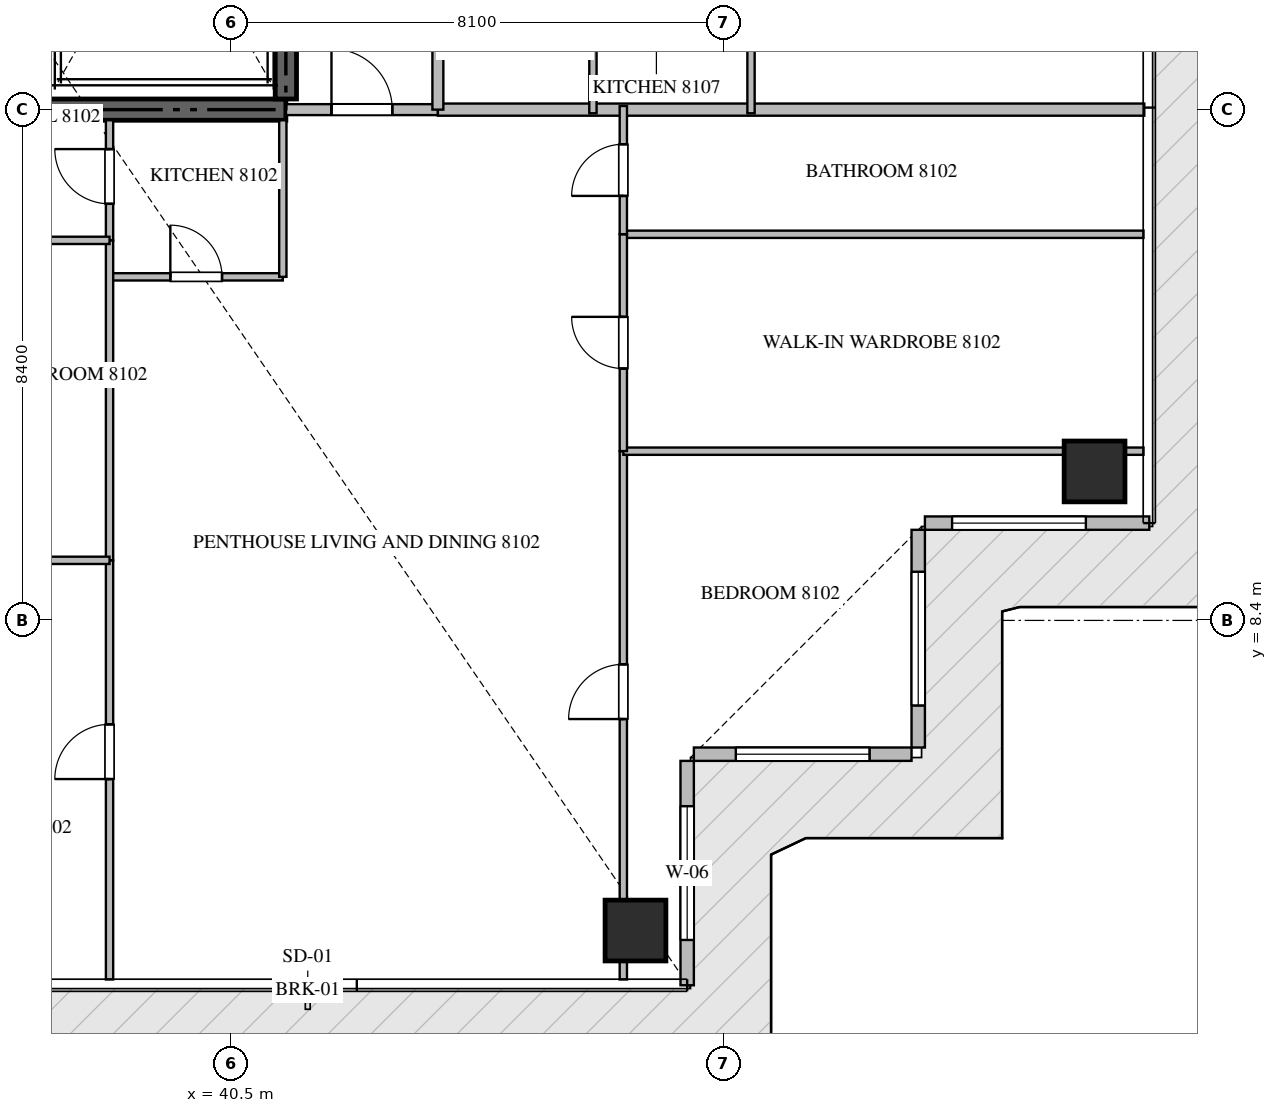
"""IFC4 building model, lengths in metres.
Left out: names, types, materials, properties, quantities, classifications, styles, units other than length and angle.
Written with IfcOpenShell. Run it as: python <this file> out.ifc"""

import sys

from ifc_helpers import new_model, si_unit, direction, frame, frame_2d, origin, origin_2d, place, context, subcontext, project, spatial, rectangle, extrude, source, transform, mapped, element, fill, save


model = new_model("IFC4")
c1 = context("Model", 3, precision=1e-05, world=origin(), true_north=direction((0.0, 1.0)))
c2 = subcontext(c1, "Body", "Model", "MODEL_VIEW")
j1 = project(units=[si_unit("LENGTHUNIT", "METRE"), si_unit("PLANEANGLEUNIT", "RADIAN")], contexts=[c1])
p1 = place(None, origin())
s1 = spatial("IfcSite", under=j1, at=p1, CompositionType="ELEMENT")
p2 = place(p1, origin())
s2 = spatial("IfcBuilding", under=s1, at=p2, CompositionType="ELEMENT")
p3 = place(p2, frame((0.0, 0.0, 325.85)))
s3 = spatial("IfcBuildingStorey", under=s2, at=p3, CompositionType="ELEMENT", Elevation=325.85)
p4 = place(p3, frame((23.4, 16.8, -0.26), z_axis=(0.0, 0.0, 1.0), x_axis=(1.0, 0.0, 0.0)))
e1 = element("IfcWall", 1, at=p4, inside=s3, PredefinedType="SHEAR", context=c2, shape_type="SweptSolid", body=[
    extrude(rectangle(XDim=18.0, YDim=0.35, at=frame_2d((9.0, 0.0))), origin(), (0.0, 0.0, 1.0), 4.048),
])
p5 = place(p3, frame((41.4, 16.975, -0.26), z_axis=(0.0, 0.0, 1.0), x_axis=(0.0, 1.0, 0.0)))
e2 = element("IfcWall", 2, at=p5, inside=s3, PredefinedType="SHEAR", context=c2, shape_type="SweptSolid", body=[
    extrude(rectangle(XDim=8.375, YDim=0.35, at=frame_2d((4.188, 0.0))), origin(), (0.0, 0.0, 1.0), 4.048),
])
m1 = source(origin(), c2, "Body", "SweptSolid", [
    extrude(rectangle(XDim=1.0, YDim=1.0, at=origin_2d()), origin(), (0.0, 0.0, 1.0), 4.05),
])
for number, where, z_axis, x_axis in (
    (3, (47.15, 3.3, -0.26), (0.0, 0.0, 1.0), (1.0, 0.0, 0.0)),
    (4, (54.7, 10.85, -0.26), (0.0, 0.0, 1.0), (1.0, 0.0, 0.0)),
):
    element("IfcColumn", number, at=place(p3, frame(where, z_axis=z_axis, x_axis=x_axis)), inside=s3, PredefinedType="COLUMN", context=c2, shape_type="MappedRepresentation", body=[
        mapped(m1, transform((0.0, 0.0, 0.0), scale=1.0)),
    ])
p6 = place(p3, frame((48.0, 2.4, 0.0), z_axis=(0.0, 0.0, 1.0), x_axis=(0.0, 1.0, 0.0)))
e5 = element("IfcWall", 5, at=p6, inside=s3, PredefinedType="ELEMENTEDWALL", context=c2, shape_type="SweptSolid", body=[
    extrude(rectangle(XDim=3.69, YDim=0.22, at=frame_2d((1.845, 0.0))), origin(), (0.0, 0.0, 1.0), 3.775),
])
p7 = place(p6, frame((0.745, 0.0, 0.65)))
e6 = element("IfcOpeningElement", 6, at=p7, cuts=e5, PredefinedType="OPENING", context=c2, shape_type="SweptSolid", body=[
    extrude(rectangle(XDim=2.2, YDim=2.4, at=frame_2d((1.1, 1.2))), frame((0.0, 0.12, 0.0), z_axis=(0.0, -1.0, 0.0), x_axis=(1.0, 0.0, 0.0)), (0.0, 0.0, 1.0), 0.24),
])
p8 = place(p3, frame((48.11, 6.2, 0.0), z_axis=(0.0, 0.0, 1.0), x_axis=(1.0, 0.0, 0.0)))
e7 = element("IfcWall", 7, at=p8, inside=s3, PredefinedType="ELEMENTEDWALL", context=c2, shape_type="SweptSolid", body=[
    extrude(rectangle(XDim=3.58, YDim=0.22, at=frame_2d((1.79, 0.0))), origin(), (0.0, 0.0, 1.0), 3.775),
])
p9 = place(p8, frame((0.69, 0.0, 0.65)))
e8 = element("IfcOpeningElement", 8, at=p9, cuts=e7, PredefinedType="OPENING", context=c2, shape_type="SweptSolid", body=[
    extrude(rectangle(XDim=2.2, YDim=2.4, at=frame_2d((1.1, 1.2))), frame((0.0, 0.12, 0.0), z_axis=(0.0, -1.0, 0.0), x_axis=(1.0, 0.0, 0.0)), (0.0, 0.0, 1.0), 0.24),
])
p10 = place(p3, frame((51.8, 6.31, 0.0), z_axis=(0.0, 0.0, 1.0), x_axis=(0.0, 1.0, 0.0)))
e9 = element("IfcWall", 9, at=p10, inside=s3, PredefinedType="ELEMENTEDWALL", context=c2, shape_type="SweptSolid", body=[
    extrude(rectangle(XDim=3.58, YDim=0.22, at=frame_2d((1.79, 0.0))), origin(), (0.0, 0.0, 1.0), 3.775),
])
p11 = place(p10, frame((0.69, 0.0, 0.65)))
e10 = element("IfcOpeningElement", 10, at=p11, cuts=e9, PredefinedType="OPENING", context=c2, shape_type="SweptSolid", body=[
    extrude(rectangle(XDim=2.2, YDim=2.4, at=frame_2d((1.1, 1.2))), frame((0.0, 0.12, 0.0), z_axis=(0.0, -1.0, 0.0), x_axis=(1.0, 0.0, 0.0)), (0.0, 0.0, 1.0), 0.24),
])
p12 = place(p3, frame((51.91, 10.0, 0.0), z_axis=(0.0, 0.0, 1.0), x_axis=(1.0, 0.0, 0.0)))
e11 = element("IfcWall", 11, at=p12, inside=s3, PredefinedType="ELEMENTEDWALL", context=c2, shape_type="SweptSolid", body=[
    extrude(rectangle(XDim=3.69, YDim=0.22, at=frame_2d((1.845, 0.0))), origin(), (0.0, 0.0, 1.0), 3.775),
])
p13 = place(p12, frame((0.447, 0.0, 0.65)))
e12 = element("IfcOpeningElement", 12, at=p13, cuts=e11, PredefinedType="OPENING", context=c2, shape_type="SweptSolid", body=[
    extrude(rectangle(XDim=2.2, YDim=2.4, at=frame_2d((1.1, 1.2))), frame((0.0, 0.12, 0.0), z_axis=(0.0, -1.0, 0.0), x_axis=(1.0, 0.0, 0.0)), (0.0, 0.0, 1.0), 0.24),
])
p14 = place(p3, frame((43.9, 16.8, 0.0), z_axis=(0.0, 0.0, 1.0), x_axis=(1.0, 0.0, 0.0)))
e13 = element("IfcWall", 13, at=p14, inside=s3, PredefinedType="PARTITIONING", context=c2, shape_type="SweptSolid", body=[
    extrude(rectangle(XDim=11.618, YDim=0.2, at=frame_2d((5.809, 0.0))), origin(), (0.0, 0.0, 1.0), 3.79),
])
p15 = place(p3, frame((41.402, 16.8, 0.0), z_axis=(0.0, 0.0, 1.0), x_axis=(1.0, 0.0, 0.0)))
e14 = element("IfcWall", 14, at=p15, inside=s3, PredefinedType="PARTITIONING", context=c2, shape_type="SweptSolid", body=[
    extrude(rectangle(XDim=2.496, YDim=0.18, at=frame_2d((1.248, 0.0))), origin(), (0.0, 0.0, 1.0), 3.79),
])
p16 = place(p15, frame((0.748, 0.0, 0.0)))
e15 = element("IfcOpeningElement", 15, at=p16, cuts=e14, PredefinedType="OPENING", context=c2, shape_type="SweptSolid", body=[
    extrude(rectangle(XDim=1.0, YDim=2.15, at=frame_2d((0.5, 1.075))), frame((0.0, 0.1, 0.0), z_axis=(0.0, -1.0, 0.0), x_axis=(1.0, 0.0, 0.0)), (0.0, 0.0, 1.0), 0.2),
])
p17 = place(p3, frame((43.9, 16.8, 0.0), z_axis=(0.0, 0.0, 1.0), x_axis=(0.0, 1.0, 0.0)))
e16 = element("IfcWall", 16, at=p17, inside=s3, PredefinedType="PARTITIONING", context=c2, shape_type="SweptSolid", body=[
    extrude(rectangle(XDim=16.8, YDim=0.18, at=frame_2d((8.4, 0.0))), origin(), (0.0, 0.0, 1.0), 3.79),
])
p18 = place(p17, frame((4.598, 0.0, 0.0)))
e17 = element("IfcOpeningElement", 17, at=p18, cuts=e16, PredefinedType="OPENING", context=c2, shape_type="SweptSolid", body=[
    extrude(rectangle(XDim=1.0, YDim=2.15, at=frame_2d((0.5, 1.075))), frame((0.0, 0.1, 0.0), z_axis=(0.0, -1.0, 0.0), x_axis=(1.0, 0.0, 0.0)), (0.0, 0.0, 1.0), 0.2),
])
p19 = place(p17, frame((8.801, 0.0, 0.0)))
e18 = element("IfcOpeningElement", 18, at=p19, cuts=e16, PredefinedType="OPENING", context=c2, shape_type="SweptSolid", body=[
    extrude(rectangle(XDim=1.0, YDim=2.15, at=frame_2d((0.5, 1.075))), frame((0.0, 0.1, 0.0), z_axis=(0.0, -1.0, 0.0), x_axis=(1.0, 0.0, 0.0)), (0.0, 0.0, 1.0), 0.2),
])
p20 = place(p3, frame((38.5, 14.05, 0.0), z_axis=(0.0, 0.0, 1.0), x_axis=(1.0, 0.0, 0.0)))
e19 = element("IfcWall", 19, at=p20, inside=s3, PredefinedType="PARTITIONING", context=c2, shape_type="SweptSolid", body=[
    extrude(rectangle(XDim=2.85, YDim=0.12, at=frame_2d((1.425, 0.0))), origin(), (0.0, 0.0, 1.0), 3.79),
])
p21 = place(p20, frame((1.0, 0.0, 0.0)))
e20 = element("IfcOpeningElement", 20, at=p21, cuts=e19, PredefinedType="OPENING", context=c2, shape_type="SweptSolid", body=[
    extrude(rectangle(XDim=0.85, YDim=2.1, at=frame_2d((0.425, 1.05))), frame((0.0, 0.07, 0.0), z_axis=(0.0, -1.0, 0.0), x_axis=(1.0, 0.0, 0.0)), (0.0, 0.0, 1.0), 0.14),
])
p22 = place(p3, frame((41.35, 14.05, 0.0), z_axis=(0.0, 0.0, 1.0), x_axis=(0.0, 1.0, 0.0)))
e21 = element("IfcWall", 21, at=p22, inside=s3, PredefinedType="PARTITIONING", context=c2, shape_type="SweptSolid", body=[
    extrude(rectangle(XDim=2.575, YDim=0.12, at=frame_2d((1.288, 0.0))), origin(), (0.0, 0.0, 1.0), 3.79),
])
p23 = place(p3, frame((38.5, 14.65, 0.0), z_axis=(0.0, 0.0, 1.0), x_axis=(0.0, 1.0, 0.0)))
e22 = element("IfcWall", 22, at=p23, inside=s3, PredefinedType="PARTITIONING", context=c2, shape_type="SweptSolid", body=[
    extrude(rectangle(XDim=1.975, YDim=0.12, at=frame_2d((0.988, 0.0))), origin(), (0.0, 0.0, 1.0), 3.79),
])
p24 = place(p23, frame((0.601, 0.0, 0.0)))
e23 = element("IfcOpeningElement", 23, at=p24, cuts=e22, PredefinedType="OPENING", context=c2, shape_type="SweptSolid", body=[
    extrude(rectangle(XDim=0.9, YDim=2.1, at=frame_2d((0.45, 1.05))), frame((0.0, 0.07, 0.0), z_axis=(0.0, -1.0, 0.0), x_axis=(1.0, 0.0, 0.0)), (0.0, 0.0, 1.0), 0.14),
])
p25 = place(p3, frame((38.5, 2.495, 0.0), z_axis=(0.0, 0.0, 1.0), x_axis=(0.0, 1.0, 0.0)))
e24 = element("IfcWall", 24, at=p25, inside=s3, PredefinedType="PARTITIONING", context=c2, shape_type="SweptSolid", body=[
    extrude(rectangle(XDim=6.893, YDim=0.12, at=frame_2d((3.446, 0.0))), origin(), (0.0, 0.0, 1.0), 3.79),
])
p26 = place(p25, frame((3.296, 0.0, 0.0)))
e25 = element("IfcOpeningElement", 25, at=p26, cuts=e24, PredefinedType="OPENING", context=c2, shape_type="SweptSolid", body=[
    extrude(rectangle(XDim=0.9, YDim=2.1, at=frame_2d((0.45, 1.05))), frame((0.0, 0.07, 0.0), z_axis=(0.0, -1.0, 0.0), x_axis=(1.0, 0.0, 0.0)), (0.0, 0.0, 1.0), 0.14),
])
p27 = place(p3, frame((38.5, 9.39, 0.0), z_axis=(0.0, 0.0, 1.0), x_axis=(0.0, 1.0, 0.0)))
e26 = element("IfcWall", 26, at=p27, inside=s3, PredefinedType="PARTITIONING", context=c2, shape_type="SweptSolid", body=[
    extrude(rectangle(XDim=5.258, YDim=0.12, at=frame_2d((2.629, 0.0))), origin(), (0.0, 0.0, 1.0), 3.79),
])
p28 = place(p3, frame((33.38, 9.388, 0.0), z_axis=(0.0, 0.0, 1.0), x_axis=(1.0, 0.0, 0.0)))
e27 = element("IfcWall", 27, at=p28, inside=s3, PredefinedType="PARTITIONING", context=c2, shape_type="SweptSolid", body=[
    extrude(rectangle(XDim=5.12, YDim=0.12, at=frame_2d((2.56, 0.0))), origin(), (0.0, 0.0, 1.0), 3.79),
])
p29 = place(p3, frame((35.482, 14.65, 0.0), z_axis=(0.0, 0.0, 1.0), x_axis=(1.0, 0.0, 0.0)))
e28 = element("IfcWall", 28, at=p29, inside=s3, PredefinedType="PARTITIONING", context=c2, shape_type="SweptSolid", body=[
    extrude(rectangle(XDim=3.018, YDim=0.12, at=frame_2d((1.509, 0.0))), origin(), (0.0, 0.0, 1.0), 3.79),
])
p30 = place(p29, frame((1.084, 0.0, 0.0)))
e29 = element("IfcOpeningElement", 29, at=p30, cuts=e28, PredefinedType="OPENING", context=c2, shape_type="SweptSolid", body=[
    extrude(rectangle(XDim=0.85, YDim=2.1, at=frame_2d((0.425, 1.05))), frame((0.0, 0.07, 0.0), z_axis=(0.0, -1.0, 0.0), x_axis=(1.0, 0.0, 0.0)), (0.0, 0.0, 1.0), 0.14),
])
p31 = place(p3, frame((46.95, 2.495, 0.0), z_axis=(0.0, 0.0, 1.0), x_axis=(0.0, 1.0, 0.0)))
e30 = element("IfcWall", 30, at=p31, inside=s3, PredefinedType="PARTITIONING", context=c2, shape_type="SweptSolid", body=[
    extrude(rectangle(XDim=8.688, YDim=0.12, at=frame_2d((4.344, 0.0))), origin(), (0.0, 0.0, 1.0), 3.292),
])
p32 = place(p31, frame((4.283, 0.0, 0.0)))
e31 = element("IfcOpeningElement", 31, at=p32, cuts=e30, PredefinedType="OPENING", context=c2, shape_type="SweptSolid", body=[
    extrude(rectangle(XDim=0.9, YDim=2.1, at=frame_2d((0.45, 1.05))), frame((0.0, 0.07, 0.0), z_axis=(0.0, -1.0, 0.0), x_axis=(1.0, 0.0, 0.0)), (0.0, 0.0, 1.0), 0.14),
])
for number, where, z_axis, x_axis in (
    (32, (46.95, 11.183, 0.0), (0.0, 0.0, 1.0), (1.0, 0.0, 0.0)),
    (33, (46.95, 14.75, 0.0), (0.0, 0.0, 1.0), (1.0, 0.0, 0.0)),
):
    element("IfcWall", number, at=place(p3, frame(where, z_axis=z_axis, x_axis=x_axis)), inside=s3, PredefinedType="PARTITIONING", context=c2, shape_type="SweptSolid", body=[
        extrude(rectangle(XDim=8.555, YDim=0.12, at=frame_2d((4.277, 0.0))), origin(), (0.0, 0.0, 1.0), 3.79),
    ])
p33 = place(p3, frame((46.95, 11.185, 0.0), z_axis=(0.0, 0.0, 1.0), x_axis=(0.0, 1.0, 0.0)))
e34 = element("IfcWall", 34, at=p33, inside=s3, PredefinedType="PARTITIONING", context=c2, shape_type="SweptSolid", body=[
    extrude(rectangle(XDim=3.565, YDim=0.12, at=frame_2d((1.782, 0.0))), origin(), (0.0, 0.0, 1.0), 3.372),
])
p34 = place(p33, frame((1.357, 0.0, 0.0)))
e35 = element("IfcOpeningElement", 35, at=p34, cuts=e34, PredefinedType="OPENING", context=c2, shape_type="SweptSolid", body=[
    extrude(rectangle(XDim=0.85, YDim=2.1, at=frame_2d((0.425, 1.05))), frame((0.0, 0.07, 0.0), z_axis=(0.0, -1.0, 0.0), x_axis=(1.0, 0.0, 0.0)), (0.0, 0.0, 1.0), 0.14),
])
p35 = place(p3, frame((46.95, 14.752, 0.0), z_axis=(0.0, 0.0, 1.0), x_axis=(0.0, 1.0, 0.0)))
e36 = element("IfcWall", 36, at=p35, inside=s3, PredefinedType="PARTITIONING", context=c2, shape_type="SweptSolid", body=[
    extrude(rectangle(XDim=2.108, YDim=0.12, at=frame_2d((1.054, 0.0))), origin(), (0.0, 0.0, 1.0), 3.372),
])
p36 = place(p35, frame((0.629, 0.0, 0.0)))
e37 = element("IfcOpeningElement", 37, at=p36, cuts=e36, PredefinedType="OPENING", context=c2, shape_type="SweptSolid", body=[
    extrude(rectangle(XDim=0.85, YDim=2.1, at=frame_2d((0.425, 1.05))), frame((0.0, 0.07, 0.0), z_axis=(0.0, -1.0, 0.0), x_axis=(1.0, 0.0, 0.0)), (0.0, 0.0, 1.0), 0.14),
])
for number, where, z_axis, x_axis in (
    (38, (46.45, 16.74, 0.0), (0.0, 0.0, 1.0), (0.0, 1.0, 0.0)),
    (39, (49.05, 16.74, 0.0), (0.0, 0.0, 1.0), (0.0, 1.0, 0.0)),
):
    element("IfcWall", number, at=place(p3, frame(where, z_axis=z_axis, x_axis=x_axis)), inside=s3, PredefinedType="PARTITIONING", context=c2, shape_type="SweptSolid", body=[
        extrude(rectangle(XDim=2.66, YDim=0.12, at=frame_2d((1.33, 0.0))), origin(), (0.0, 0.0, 1.0), 3.79),
    ])
m2 = source(origin(), c2, "Body", "SweptSolid", [
    extrude(rectangle(XDim=2.2, YDim=2.4, at=frame_2d((1.1, 1.2))), frame((0.0, 0.03, 0.0), z_axis=(0.0, -1.0, 0.0), x_axis=(1.0, 0.0, 0.0)), (0.0, 0.0, 1.0), 0.06),
])
p37 = place(p7, origin())
e40 = element("IfcWindow", 40, at=p37, inside=s3, PartitioningType="SINGLE_PANEL", PredefinedType="WINDOW", context=c2, shape_type="MappedRepresentation", body=[
    mapped(m2, transform((0.0, 0.0, 0.0), scale=1.0)),
])
fill(e6, e40)
p38 = place(p9, origin())
e41 = element("IfcWindow", 41, at=p38, inside=s3, PartitioningType="SINGLE_PANEL", PredefinedType="WINDOW", context=c2, shape_type="MappedRepresentation", body=[
    mapped(m2, transform((0.0, 0.0, 0.0), scale=1.0)),
])
fill(e8, e41)
p39 = place(p11, origin())
e42 = element("IfcWindow", 42, at=p39, inside=s3, PartitioningType="SINGLE_PANEL", PredefinedType="WINDOW", context=c2, shape_type="MappedRepresentation", body=[
    mapped(m2, transform((0.0, 0.0, 0.0), scale=1.0)),
])
fill(e10, e42)
p40 = place(p13, origin())
e43 = element("IfcWindow", 43, at=p40, inside=s3, PartitioningType="SINGLE_PANEL", PredefinedType="WINDOW", context=c2, shape_type="MappedRepresentation", body=[
    mapped(m2, transform((0.0, 0.0, 0.0), scale=1.0)),
])
fill(e12, e43)
m3 = source(origin(), c2, "Body", "SweptSolid", [
    extrude(rectangle(XDim=1.0, YDim=2.15, at=frame_2d((0.5, 1.075))), frame((0.0, 0.025, 0.0), z_axis=(0.0, -1.0, 0.0), x_axis=(1.0, 0.0, 0.0)), (0.0, 0.0, 1.0), 0.05),
])
p41 = place(p16, origin())
e44 = element("IfcDoor", 44, at=p41, inside=s3, OperationType="SINGLE_SWING_LEFT", PredefinedType="DOOR", context=c2, shape_type="MappedRepresentation", body=[
    mapped(m3, transform((0.0, 0.0, 0.0), scale=1.0)),
])
fill(e15, e44)
m4 = source(origin(), c2, "Body", "SweptSolid", [
    extrude(rectangle(XDim=0.85, YDim=2.1, at=frame_2d((0.425, 1.05))), frame((0.0, 0.025, 0.0), z_axis=(0.0, -1.0, 0.0), x_axis=(1.0, 0.0, 0.0)), (0.0, 0.0, 1.0), 0.05),
])
p42 = place(p21, origin())
e45 = element("IfcDoor", 45, at=p42, inside=s3, OperationType="SINGLE_SWING_LEFT", PredefinedType="DOOR", context=c2, shape_type="MappedRepresentation", body=[
    mapped(m4, transform((0.0, 0.0, 0.0), scale=1.0)),
])
fill(e20, e45)
m5 = source(origin(), c2, "Body", "SweptSolid", [
    extrude(rectangle(XDim=0.9, YDim=2.1, at=frame_2d((0.45, 1.05))), frame((0.0, 0.025, 0.0), z_axis=(0.0, -1.0, 0.0), x_axis=(1.0, 0.0, 0.0)), (0.0, 0.0, 1.0), 0.05),
])
p43 = place(p24, origin())
e46 = element("IfcDoor", 46, at=p43, inside=s3, OperationType="SINGLE_SWING_RIGHT", PredefinedType="DOOR", context=c2, shape_type="MappedRepresentation", body=[
    mapped(m5, transform((0.0, 0.0, 0.0), scale=1.0)),
])
fill(e23, e46)
p44 = place(p26, origin())
e47 = element("IfcDoor", 47, at=p44, inside=s3, OperationType="SINGLE_SWING_LEFT", PredefinedType="DOOR", context=c2, shape_type="MappedRepresentation", body=[
    mapped(m5, transform((0.0, 0.0, 0.0), scale=1.0)),
])
fill(e25, e47)
p45 = place(p32, origin())
e48 = element("IfcDoor", 48, at=p45, inside=s3, OperationType="SINGLE_SWING_LEFT", PredefinedType="DOOR", context=c2, shape_type="MappedRepresentation", body=[
    mapped(m5, transform((0.0, 0.0, 0.0), scale=1.0)),
])
fill(e31, e48)
p46 = place(p34, origin())
e49 = element("IfcDoor", 49, at=p46, inside=s3, OperationType="SINGLE_SWING_RIGHT", PredefinedType="DOOR", context=c2, shape_type="MappedRepresentation", body=[
    mapped(m4, transform((0.0, 0.0, 0.0), scale=1.0)),
])
fill(e35, e49)
p47 = place(p36, origin())
e50 = element("IfcDoor", 50, at=p47, inside=s3, OperationType="SINGLE_SWING_LEFT", PredefinedType="DOOR", context=c2, shape_type="MappedRepresentation", body=[
    mapped(m4, transform((0.0, 0.0, 0.0), scale=1.0)),
])
fill(e37, e50)
save(model, sys.argv[1])
